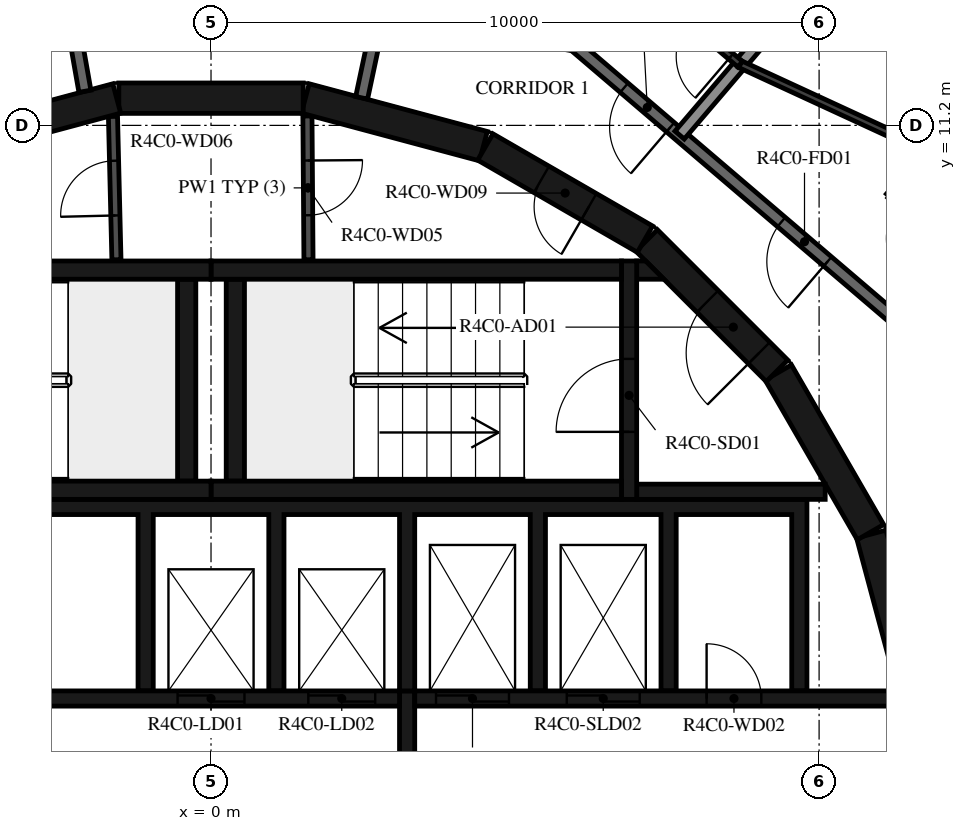
"""IFC4 building model, lengths in metres.
Left out: names, types, materials, properties, quantities, classifications, styles, units other than length and angle.
Written with IfcOpenShell. Run it as: python <this file> out.ifc"""

import sys

from ifc_helpers import new_model, si_unit, direction, frame, frame_2d, origin, place, context, subcontext, project, spatial, polyline, rectangle, outline, extrude, element, fill, save


model = new_model("IFC4")
c1 = context("Model", 3, precision=1e-05, world=origin(), true_north=direction((0.0, 1.0)))
c2 = subcontext(c1, "Body", "Model", "MODEL_VIEW")
j1 = project(units=[si_unit("LENGTHUNIT", "METRE"), si_unit("PLANEANGLEUNIT", "RADIAN")], contexts=[c1])
p1 = place(None, origin())
s1 = spatial("IfcSite", under=j1, at=p1, CompositionType="ELEMENT")
p2 = place(p1, origin())
s2 = spatial("IfcBuilding", under=s1, at=p2, CompositionType="ELEMENT")
p3 = place(p2, frame((0.0, 0.0, 172.7)))
s3 = spatial("IfcBuildingStorey", under=s2, at=p3, CompositionType="ELEMENT", Elevation=172.7)
for number, where, z_axis, x_axis in (
    (1, (11.643, 1.55, 0.0), (0.0, 0.0, 1.0), (-0.259, 0.966, 0.0)),
    (2, (10.845, 4.51, 0.0), (0.0, 0.0, 1.0), (-0.5, 0.866, 0.0)),
):
    element("IfcWall", number, at=place(p3, frame(where, z_axis=z_axis, x_axis=x_axis)), inside=s3, PredefinedType="SHEAR", context=c2, shape_type="SweptSolid", body=[
        extrude(rectangle(XDim=3.033, YDim=0.5, at=frame_2d((1.516, 0.0))), origin(), (0.0, 0.0, 1.0), 3.12),
    ])
p4 = place(p3, frame((9.308, 7.164, 0.0), z_axis=(0.0, 0.0, 1.0), x_axis=(-0.707106781187, 0.707106781187, 0.0)))
e3 = element("IfcWall", 3, at=p4, inside=s3, PredefinedType="SHEAR", context=c2, shape_type="SweptSolid", body=[
    extrude(rectangle(XDim=3.032, YDim=0.5, at=frame_2d((1.516, 0.0))), origin(), (0.0, 0.0, 1.0), 3.12),
])
p5 = place(p4, frame((0.416, 0.0, 0.0)))
e4 = element("IfcOpeningElement", 4, at=p5, cuts=e3, PredefinedType="OPENING", context=c2, shape_type="SweptSolid", body=[
    extrude(rectangle(XDim=1.2, YDim=2.1, at=frame_2d((0.6, 1.05))), frame((0.0, 0.26, 0.0), z_axis=(0.0, -1.0, 0.0), x_axis=(1.0, 0.0, 0.0)), (0.0, 0.0, 1.0), 0.52),
])
p6 = place(p3, frame((7.137, 9.329, 0.0), z_axis=(0.0, 0.0, 1.0), x_axis=(-0.865975092491, 0.500087131594, 0.0)))
e5 = element("IfcWall", 5, at=p6, inside=s3, PredefinedType="SHEAR", context=c2, shape_type="SweptSolid", body=[
    extrude(rectangle(XDim=3.033, YDim=0.5, at=frame_2d((1.516, 0.0))), origin(), (0.0, 0.0, 1.0), 3.12),
])
p7 = place(p6, frame((1.066, 0.0, 0.0)))
e6 = element("IfcOpeningElement", 6, at=p7, cuts=e5, PredefinedType="OPENING", context=c2, shape_type="SweptSolid", body=[
    extrude(rectangle(XDim=0.9, YDim=2.1, at=frame_2d((0.45, 1.05))), frame((0.0, 0.26, 0.0), z_axis=(0.0, -1.0, 0.0), x_axis=(1.0, 0.0, 0.0)), (0.0, 0.0, 1.0), 0.52),
])
for number, where, z_axis, x_axis in (
    (7, (4.479, 10.858, 0.0), (0.0, 0.0, 1.0), (-0.966, 0.259, 0.0)),
    (8, (1.516, 11.647, 0.0), (0.0, 0.0, 1.0), (-1.0, 0.0, 0.0)),
    (9, (-1.55, 11.643, 0.0), (0.0, 0.0, 1.0), (-0.966, -0.259, 0.0)),
):
    element("IfcWall", number, at=place(p3, frame(where, z_axis=z_axis, x_axis=x_axis)), inside=s3, PredefinedType="SHEAR", context=c2, shape_type="SweptSolid", body=[
        extrude(rectangle(XDim=3.033, YDim=0.5, at=frame_2d((1.516, 0.0))), origin(), (0.0, 0.0, 1.0), 3.12),
    ])
for number, where, z_axis, x_axis in (
    (10, (0.0, 5.2, 0.0), (0.0, 0.0, 1.0), (1.0, 0.0, 0.0)),
    (11, (0.0, 8.82, 0.0), (0.0, 0.0, 1.0), (1.0, 0.0, 0.0)),
):
    element("IfcWall", number, at=place(p3, frame(where, z_axis=z_axis, x_axis=x_axis)), inside=s3, PredefinedType="SHEAR", context=c2, shape_type="SweptSolid", body=[
        extrude(rectangle(XDim=6.75, YDim=0.3, at=frame_2d((3.375, 0.0))), origin(), (0.0, 0.0, 1.0), 3.12),
    ])
p8 = place(p3, frame((0.4, 5.35, 0.0), z_axis=(0.0, 0.0, 1.0), x_axis=(0.0, 1.0, 0.0)))
e12 = element("IfcWall", 12, at=p8, inside=s3, PredefinedType="SHEAR", context=c2, shape_type="SweptSolid", body=[
    extrude(rectangle(XDim=3.32, YDim=0.3, at=frame_2d((1.66, 0.0))), origin(), (0.0, 0.0, 1.0), 3.12),
])
p9 = place(p3, frame((6.875, 5.05, 0.0), z_axis=(0.0, 0.0, 1.0), x_axis=(0.0, 1.0, 0.0)))
e13 = element("IfcWall", 13, at=p9, inside=s3, PredefinedType="SHEAR", context=c2, shape_type="SweptSolid", body=[
    extrude(rectangle(XDim=3.92, YDim=0.25, at=frame_2d((1.96, 0.0))), origin(), (0.0, 0.0, 1.0), 3.12),
])
p10 = place(p9, frame((1.11, 0.0, 0.0)))
e14 = element("IfcOpeningElement", 14, at=p10, cuts=e13, PredefinedType="OPENING", context=c2, shape_type="SweptSolid", body=[
    extrude(rectangle(XDim=1.2, YDim=2.1, at=frame_2d((0.6, 1.05))), frame((0.0, 0.135, 0.0), z_axis=(0.0, -1.0, 0.0), x_axis=(1.0, 0.0, 0.0)), (0.0, 0.0, 1.0), 0.27),
])
p11 = place(p3, frame((7.0, 5.175, 0.0), z_axis=(0.0, 0.0, 1.0), x_axis=(1.0, 0.0, 0.0)))
e15 = element("IfcWall", 15, at=p11, inside=s3, PredefinedType="SHEAR", context=c2, shape_type="SweptSolid", body=[
    extrude(rectangle(XDim=3.1, YDim=0.25, at=frame_2d((1.55, 0.0))), origin(), (0.0, 0.0, 1.0), 3.12),
])
p12 = place(p3, origin())
e16 = element("IfcWall", 16, at=p12, inside=s3, PredefinedType="SHEAR", context=c2, shape_type="SweptSolid", body=[
    extrude(outline(polyline([(7.448, 8.67), (7.0, 8.67), (7.0, 8.97), (7.148, 8.97), (7.448, 8.67)])), origin(), (0.0, 0.0, 1.0), 3.12),
])
for number, where, z_axis, x_axis in (
    (17, (-6.75, 5.2, 0.0), (0.0, 0.0, 1.0), (1.0, 0.0, 0.0)),
    (18, (-6.75, 8.82, 0.0), (0.0, 0.0, 1.0), (1.0, 0.0, 0.0)),
):
    element("IfcWall", number, at=place(p3, frame(where, z_axis=z_axis, x_axis=x_axis)), inside=s3, PredefinedType="SHEAR", context=c2, shape_type="SweptSolid", body=[
        extrude(rectangle(XDim=6.75, YDim=0.3, at=frame_2d((3.375, 0.0))), origin(), (0.0, 0.0, 1.0), 3.12),
    ])
p13 = place(p3, frame((-0.4, 5.35, 0.0), z_axis=(0.0, 0.0, 1.0), x_axis=(0.0, 1.0, 0.0)))
e19 = element("IfcWall", 19, at=p13, inside=s3, PredefinedType="SHEAR", context=c2, shape_type="SweptSolid", body=[
    extrude(rectangle(XDim=3.32, YDim=0.3, at=frame_2d((1.66, 0.0))), origin(), (0.0, 0.0, 1.0), 3.12),
])
p14 = place(p3, origin())
e20 = element("IfcWall", 20, at=p14, inside=s3, PredefinedType="SHEAR", context=c2, shape_type="SweptSolid", body=[
    extrude(outline(polyline([(-9.55, 4.8), (-1.2, 4.8), (-1.2, 1.9), (-0.95, 1.9), (-0.95, 4.8), (0.95, 4.8), (0.95, 1.9), (1.2, 1.9), (1.2, 4.8), (3.1, 4.8), (3.1, 1.9), (3.35, 1.9), (3.35, 4.8), (5.25, 4.8), (5.25, 1.9), (5.5, 1.9), (5.5, 4.8), (7.4, 4.8), (7.4, 1.9), (7.65, 1.9), (7.65, 4.8), (9.55, 4.8), (9.55, 1.9), (9.8, 1.9), (9.8, 4.8), (9.8, 5.05), (-9.8, 5.05), (-9.8, 4.8), (-9.8, 1.9), (-9.55, 1.9), (-9.55, 4.8)])), origin(), (0.0, 0.0, 1.0), 3.12),
])
p15 = place(p3, frame((-11.28, 1.775, 0.0), z_axis=(0.0, 0.0, 1.0), x_axis=(1.0, 0.0, 0.0)))
e21 = element("IfcWall", 21, at=p15, inside=s3, PredefinedType="SHEAR", context=c2, shape_type="SweptSolid", body=[
    extrude(rectangle(XDim=14.38, YDim=0.25, at=frame_2d((7.19, 0.0))), origin(), (0.0, 0.0, 1.0), 3.12),
])
p16 = place(p15, frame((10.73, 0.0, 0.0)))
e22 = element("IfcOpeningElement", 22, at=p16, cuts=e21, PredefinedType="OPENING", context=c2, shape_type="SweptSolid", body=[
    extrude(rectangle(XDim=1.1, YDim=2.1, at=frame_2d((0.55, 1.05))), frame((0.0, 0.135, 0.0), z_axis=(0.0, -1.0, 0.0), x_axis=(1.0, 0.0, 0.0)), (0.0, 0.0, 1.0), 0.27),
])
p17 = place(p15, frame((12.88, 0.0, 0.0)))
e23 = element("IfcOpeningElement", 23, at=p17, cuts=e21, PredefinedType="OPENING", context=c2, shape_type="SweptSolid", body=[
    extrude(rectangle(XDim=1.1, YDim=2.1, at=frame_2d((0.55, 1.05))), frame((0.0, 0.135, 0.0), z_axis=(0.0, -1.0, 0.0), x_axis=(1.0, 0.0, 0.0)), (0.0, 0.0, 1.0), 0.27),
])
p18 = place(p15, frame((5.455, 0.0, 0.0)))
e24 = element("IfcOpeningElement", 24, at=p18, cuts=e21, PredefinedType="OPENING", context=c2, shape_type="SweptSolid", body=[
    extrude(rectangle(XDim=0.9, YDim=2.1, at=frame_2d((0.45, 1.05))), frame((0.0, 0.135, 0.0), z_axis=(0.0, -1.0, 0.0), x_axis=(1.0, 0.0, 0.0)), (0.0, 0.0, 1.0), 0.27),
])
p19 = place(p3, frame((3.35, 1.775, 0.0), z_axis=(0.0, 0.0, 1.0), x_axis=(1.0, 0.0, 0.0)))
e25 = element("IfcWall", 25, at=p19, inside=s3, PredefinedType="SHEAR", context=c2, shape_type="SweptSolid", body=[
    extrude(rectangle(XDim=7.93, YDim=0.25, at=frame_2d((3.965, 0.0))), origin(), (0.0, 0.0, 1.0), 3.12),
])
p20 = place(p19, frame((0.35, 0.0, 0.0)))
e26 = element("IfcOpeningElement", 26, at=p20, cuts=e25, PredefinedType="OPENING", context=c2, shape_type="SweptSolid", body=[
    extrude(rectangle(XDim=1.2, YDim=2.4, at=frame_2d((0.6, 1.2))), frame((0.0, 0.135, 0.0), z_axis=(0.0, -1.0, 0.0), x_axis=(1.0, 0.0, 0.0)), (0.0, 0.0, 1.0), 0.27),
])
p21 = place(p19, frame((2.5, 0.0, 0.0)))
e27 = element("IfcOpeningElement", 27, at=p21, cuts=e25, PredefinedType="OPENING", context=c2, shape_type="SweptSolid", body=[
    extrude(rectangle(XDim=1.2, YDim=2.4, at=frame_2d((0.6, 1.2))), frame((0.0, 0.135, 0.0), z_axis=(0.0, -1.0, 0.0), x_axis=(1.0, 0.0, 0.0)), (0.0, 0.0, 1.0), 0.27),
])
p22 = place(p19, frame((4.8, 0.0, 0.0)))
e28 = element("IfcOpeningElement", 28, at=p22, cuts=e25, PredefinedType="OPENING", context=c2, shape_type="SweptSolid", body=[
    extrude(rectangle(XDim=0.9, YDim=2.1, at=frame_2d((0.45, 1.05))), frame((0.0, 0.135, 0.0), z_axis=(0.0, -1.0, 0.0), x_axis=(1.0, 0.0, 0.0)), (0.0, 0.0, 1.0), 0.27),
])
p23 = place(p3, frame((3.225, -1.9, 0.0), z_axis=(0.0, 0.0, 1.0), x_axis=(0.0, 1.0, 0.0)))
e29 = element("IfcWall", 29, at=p23, inside=s3, PredefinedType="SHEAR", context=c2, shape_type="SweptSolid", body=[
    extrude(rectangle(XDim=3.8, YDim=0.25, at=frame_2d((1.9, 0.0))), origin(), (0.0, 0.0, 1.0), 3.12),
])
p24 = place(p3, frame((1.586, 11.354, 0.0), z_axis=(0.0, 0.0, 1.0), x_axis=(0.007227482881, -0.999973881405, 0.0)))
e30 = element("IfcWall", 30, at=p24, inside=s3, PredefinedType="PARTITIONING", context=c2, shape_type="SweptSolid", body=[
    extrude(rectangle(XDim=2.365, YDim=0.15, at=frame_2d((1.182, 0.0))), origin(), (0.0, 0.0, 1.0), 3.12),
])
p25 = place(p24, frame((0.732, 0.0, 0.0)))
e31 = element("IfcOpeningElement", 31, at=p25, cuts=e30, PredefinedType="OPENING", context=c2, shape_type="SweptSolid", body=[
    extrude(rectangle(XDim=0.9, YDim=2.1, at=frame_2d((0.45, 1.05))), frame((0.0, 0.085, 0.0), z_axis=(0.0, -1.0, 0.0), x_axis=(1.0, 0.0, 0.0)), (0.0, 0.0, 1.0), 0.17),
])
p26 = place(p3, frame((-1.555, 8.99, 0.0), z_axis=(0.0, 0.0, 1.0), x_axis=(-0.024125549686, 0.999708936567, 0.0)))
e32 = element("IfcWall", 32, at=p26, inside=s3, PredefinedType="PARTITIONING", context=c2, shape_type="SweptSolid", body=[
    extrude(rectangle(XDim=2.358, YDim=0.15, at=frame_2d((1.179, 0.0))), origin(), (0.0, 0.0, 1.0), 3.12),
])
p27 = place(p26, frame((0.729, 0.0, 0.0)))
e33 = element("IfcOpeningElement", 33, at=p27, cuts=e32, PredefinedType="OPENING", context=c2, shape_type="SweptSolid", body=[
    extrude(rectangle(XDim=0.9, YDim=2.1, at=frame_2d((0.45, 1.05))), frame((0.0, 0.085, 0.0), z_axis=(0.0, -1.0, 0.0), x_axis=(1.0, 0.0, 0.0)), (0.0, 0.0, 1.0), 0.17),
])
p28 = place(p3, frame((11.433, 7.858, 0.0), z_axis=(0.0, 0.0, 1.0), x_axis=(-0.760412154545, 0.649440801937, 0.0)))
e34 = element("IfcWall", 34, at=p28, inside=s3, PredefinedType="STANDARD", context=c2, shape_type="SweptSolid", body=[
    extrude(rectangle(XDim=7.181, YDim=0.2, at=frame_2d((3.59, 0.0))), origin(), (0.0, 0.0, 1.0), 3.12),
])
p29 = place(p28, frame((1.7, 0.0, 0.0)))
e35 = element("IfcOpeningElement", 35, at=p29, cuts=e34, PredefinedType="OPENING", context=c2, shape_type="SweptSolid", body=[
    extrude(rectangle(XDim=1.0, YDim=2.1, at=frame_2d((0.5, 1.05))), frame((0.0, 0.11, 0.0), z_axis=(0.0, -1.0, 0.0), x_axis=(1.0, 0.0, 0.0)), (0.0, 0.0, 1.0), 0.22),
])
p30 = place(p28, frame((5.101, 0.0, 0.0)))
e36 = element("IfcOpeningElement", 36, at=p30, cuts=e34, PredefinedType="OPENING", context=c2, shape_type="SweptSolid", body=[
    extrude(rectangle(XDim=1.0, YDim=2.1, at=frame_2d((0.5, 1.05))), frame((0.0, 0.11, 0.0), z_axis=(0.0, -1.0, 0.0), x_axis=(1.0, 0.0, 0.0)), (0.0, 0.0, 1.0), 0.22),
])
p31 = place(p3, frame((2.787, 13.112, 0.0), z_axis=(0.0, 0.0, 1.0), x_axis=(-0.207941001029, -0.978141370197, 0.0)))
e37 = element("IfcWall", 37, at=p31, inside=s3, PredefinedType="STANDARD", context=c2, shape_type="SweptSolid", body=[
    extrude(rectangle(XDim=1.491, YDim=0.2, at=frame_2d((0.746, 0.0))), origin(), (0.0, 0.0, 1.0), 3.12),
])
p32 = place(p3, frame((-2.074, 11.761, 0.0), z_axis=(0.0, 0.0, 1.0), x_axis=(-0.1736412798, 0.984808969267, 0.0)))
e38 = element("IfcWall", 38, at=p32, inside=s3, PredefinedType="STANDARD", context=c2, shape_type="SweptSolid", body=[
    extrude(rectangle(XDim=1.644, YDim=0.2, at=frame_2d((0.822, 0.0))), origin(), (0.0, 0.0, 1.0), 3.12),
])
p33 = place(p3, frame((-2.359, 13.38, 0.0), z_axis=(0.0, 0.0, 1.0), x_axis=(-0.942647529236, -0.333789807551, 0.0)))
e39 = element("IfcWall", 39, at=p33, inside=s3, PredefinedType="STANDARD", context=c2, shape_type="SweptSolid", body=[
    extrude(rectangle(XDim=5.833, YDim=0.2, at=frame_2d((2.917, 0.0))), origin(), (0.0, 0.0, 1.0), 3.12),
])
p34 = place(p3, frame((11.04, 14.943, 0.0), z_axis=(0.0, 0.0, 1.0), x_axis=(-0.649442880087, -0.760410379666, 0.0)))
e40 = element("IfcWall", 40, at=p34, inside=s3, PredefinedType="STANDARD", context=c2, shape_type="SweptSolid", body=[
    extrude(rectangle(XDim=5.133, YDim=0.2, at=frame_2d((2.566, 0.0))), origin(), (0.0, 0.0, 1.0), 2.73),
])
p35 = place(p3, frame((11.79, 10.781, 0.0), z_axis=(0.0, 0.0, 1.0), x_axis=(-0.907999296286, 0.418971691101, 0.0)))
e41 = element("IfcWall", 41, at=p35, inside=s3, PredefinedType="PARTITIONING", context=c2, shape_type="SweptSolid", body=[
    extrude(rectangle(XDim=3.401, YDim=0.12, at=frame_2d((1.701, 0.0))), origin(), (0.0, 0.0, 1.0), 3.12),
])
p36 = place(p3, frame((8.702, 12.206, 0.0), z_axis=(0.0, 0.0, 1.0), x_axis=(-0.760401313718, 0.649453494945, 0.0)))
e42 = element("IfcWall", 42, at=p36, inside=s3, PredefinedType="PARTITIONING", context=c2, shape_type="SweptSolid", body=[
    extrude(rectangle(XDim=16.724, YDim=0.12, at=frame_2d((8.362, 0.0))), origin(), (0.0, 0.0, 1.0), 3.12),
])
p37 = place(p36, frame((0.2, 0.0, 0.0)))
e43 = element("IfcOpeningElement", 43, at=p37, cuts=e42, PredefinedType="OPENING", context=c2, shape_type="SweptSolid", body=[
    extrude(rectangle(XDim=0.9, YDim=2.1, at=frame_2d((0.45, 1.05))), frame((0.0, 0.07, 0.0), z_axis=(0.0, -1.0, 0.0), x_axis=(1.0, 0.0, 0.0)), (0.0, 0.0, 1.0), 0.14),
])
p38 = place(p36, frame((8.02, 0.0, 0.0)))
e44 = element("IfcOpeningElement", 44, at=p38, cuts=e42, PredefinedType="OPENING", context=c2, shape_type="SweptSolid", body=[
    extrude(rectangle(XDim=0.9, YDim=2.1, at=frame_2d((0.45, 1.05))), frame((0.0, 0.07, 0.0), z_axis=(0.0, -1.0, 0.0), x_axis=(1.0, 0.0, 0.0)), (0.0, 0.0, 1.0), 0.14),
])
p39 = place(p36, frame((14.412, 0.0, 0.0)))
e45 = element("IfcOpeningElement", 45, at=p39, cuts=e42, PredefinedType="OPENING", context=c2, shape_type="SweptSolid", body=[
    extrude(rectangle(XDim=0.9, YDim=2.1, at=frame_2d((0.45, 1.05))), frame((0.0, 0.07, 0.0), z_axis=(0.0, -1.0, 0.0), x_axis=(1.0, 0.0, 0.0)), (0.0, 0.0, 1.0), 0.14),
])
p40 = place(p10, origin())
e46 = element("IfcDoor", 46, at=p40, inside=s3, OperationType="SINGLE_SWING_LEFT", PredefinedType="DOOR", context=c2, shape_type="SweptSolid", body=[
    extrude(rectangle(XDim=1.2, YDim=2.1, at=frame_2d((0.6, 1.05))), frame((0.0, 0.025, 0.0), z_axis=(0.0, -1.0, 0.0), x_axis=(1.0, 0.0, 0.0)), (0.0, 0.0, 1.0), 0.05),
])
fill(e14, e46)
p41 = place(p5, origin())
e47 = element("IfcDoor", 47, at=p41, inside=s3, OperationType="SINGLE_SWING_RIGHT", PredefinedType="DOOR", context=c2, shape_type="SweptSolid", body=[
    extrude(rectangle(XDim=1.2, YDim=2.1, at=frame_2d((0.6, 1.05))), frame((0.0, 0.025, 0.0), z_axis=(0.0, -1.0, 0.0), x_axis=(1.0, 0.0, 0.0)), (0.0, 0.0, 1.0), 0.05),
])
fill(e4, e47)
p42 = place(p16, origin())
e48 = element("IfcDoor", 48, at=p42, inside=s3, OperationType="DOUBLE_DOOR_SLIDING", PredefinedType="DOOR", context=c2, shape_type="SweptSolid", body=[
    extrude(rectangle(XDim=1.1, YDim=2.1, at=frame_2d((0.55, 1.05))), frame((0.0, 0.025, 0.0), z_axis=(0.0, -1.0, 0.0), x_axis=(1.0, 0.0, 0.0)), (0.0, 0.0, 1.0), 0.05),
])
fill(e22, e48)
p43 = place(p17, origin())
e49 = element("IfcDoor", 49, at=p43, inside=s3, OperationType="DOUBLE_DOOR_SLIDING", PredefinedType="DOOR", context=c2, shape_type="SweptSolid", body=[
    extrude(rectangle(XDim=1.1, YDim=2.1, at=frame_2d((0.55, 1.05))), frame((0.0, 0.025, 0.0), z_axis=(0.0, -1.0, 0.0), x_axis=(1.0, 0.0, 0.0)), (0.0, 0.0, 1.0), 0.05),
])
fill(e23, e49)
p44 = place(p20, origin())
e50 = element("IfcDoor", 50, at=p44, inside=s3, OperationType="DOUBLE_DOOR_SLIDING", PredefinedType="DOOR", context=c2, shape_type="SweptSolid", body=[
    extrude(rectangle(XDim=1.2, YDim=2.4, at=frame_2d((0.6, 1.2))), frame((0.0, 0.025, 0.0), z_axis=(0.0, -1.0, 0.0), x_axis=(1.0, 0.0, 0.0)), (0.0, 0.0, 1.0), 0.05),
])
fill(e26, e50)
p45 = place(p21, origin())
e51 = element("IfcDoor", 51, at=p45, inside=s3, OperationType="DOUBLE_DOOR_SLIDING", PredefinedType="DOOR", context=c2, shape_type="SweptSolid", body=[
    extrude(rectangle(XDim=1.2, YDim=2.4, at=frame_2d((0.6, 1.2))), frame((0.0, 0.025, 0.0), z_axis=(0.0, -1.0, 0.0), x_axis=(1.0, 0.0, 0.0)), (0.0, 0.0, 1.0), 0.05),
])
fill(e27, e51)
p46 = place(p22, origin())
e52 = element("IfcDoor", 52, at=p46, inside=s3, OperationType="SINGLE_SWING_RIGHT", PredefinedType="DOOR", context=c2, shape_type="SweptSolid", body=[
    extrude(rectangle(XDim=0.9, YDim=2.1, at=frame_2d((0.45, 1.05))), frame((0.0, 0.025, 0.0), z_axis=(0.0, -1.0, 0.0), x_axis=(1.0, 0.0, 0.0)), (0.0, 0.0, 1.0), 0.05),
])
fill(e28, e52)
p47 = place(p25, origin())
e53 = element("IfcDoor", 53, at=p47, inside=s3, OperationType="SINGLE_SWING_LEFT", PredefinedType="DOOR", context=c2, shape_type="SweptSolid", body=[
    extrude(rectangle(XDim=0.9, YDim=2.1, at=frame_2d((0.45, 1.05))), frame((0.0, 0.025, 0.0), z_axis=(0.0, -1.0, 0.0), x_axis=(1.0, 0.0, 0.0)), (0.0, 0.0, 1.0), 0.05),
])
fill(e31, e53)
p48 = place(p27, origin())
e54 = element("IfcDoor", 54, at=p48, inside=s3, OperationType="SINGLE_SWING_RIGHT", PredefinedType="DOOR", context=c2, shape_type="SweptSolid", body=[
    extrude(rectangle(XDim=0.9, YDim=2.1, at=frame_2d((0.45, 1.05))), frame((0.0, 0.025, 0.0), z_axis=(0.0, -1.0, 0.0), x_axis=(1.0, 0.0, 0.0)), (0.0, 0.0, 1.0), 0.05),
])
fill(e33, e54)
p49 = place(p7, origin())
e55 = element("IfcDoor", 55, at=p49, inside=s3, OperationType="SINGLE_SWING_LEFT", PredefinedType="DOOR", context=c2, shape_type="SweptSolid", body=[
    extrude(rectangle(XDim=0.9, YDim=2.1, at=frame_2d((0.45, 1.05))), frame((0.0, 0.025, 0.0), z_axis=(0.0, -1.0, 0.0), x_axis=(1.0, 0.0, 0.0)), (0.0, 0.0, 1.0), 0.05),
])
fill(e6, e55)
p50 = place(p29, origin())
e56 = element("IfcDoor", 56, at=p50, inside=s3, OperationType="SINGLE_SWING_LEFT", PredefinedType="DOOR", context=c2, shape_type="SweptSolid", body=[
    extrude(rectangle(XDim=1.0, YDim=2.1, at=frame_2d((0.5, 1.05))), frame((0.0, 0.025, 0.0), z_axis=(0.0, -1.0, 0.0), x_axis=(1.0, 0.0, 0.0)), (0.0, 0.0, 1.0), 0.05),
])
fill(e35, e56)
p51 = place(p30, origin())
e57 = element("IfcDoor", 57, at=p51, inside=s3, OperationType="SINGLE_SWING_RIGHT", PredefinedType="DOOR", context=c2, shape_type="SweptSolid", body=[
    extrude(rectangle(XDim=1.0, YDim=2.1, at=frame_2d((0.5, 1.05))), frame((0.0, 0.025, 0.0), z_axis=(0.0, -1.0, 0.0), x_axis=(1.0, 0.0, 0.0)), (0.0, 0.0, 1.0), 0.05),
])
fill(e36, e57)
p52 = place(p37, origin())
e58 = element("IfcDoor", 58, at=p52, inside=s3, OperationType="SINGLE_SWING_RIGHT", PredefinedType="DOOR", context=c2, shape_type="SweptSolid", body=[
    extrude(rectangle(XDim=0.9, YDim=2.1, at=frame_2d((0.45, 1.05))), frame((0.0, 0.025, 0.0), z_axis=(0.0, -1.0, 0.0), x_axis=(1.0, 0.0, 0.0)), (0.0, 0.0, 1.0), 0.05),
])
fill(e43, e58)
save(model, sys.argv[1])
